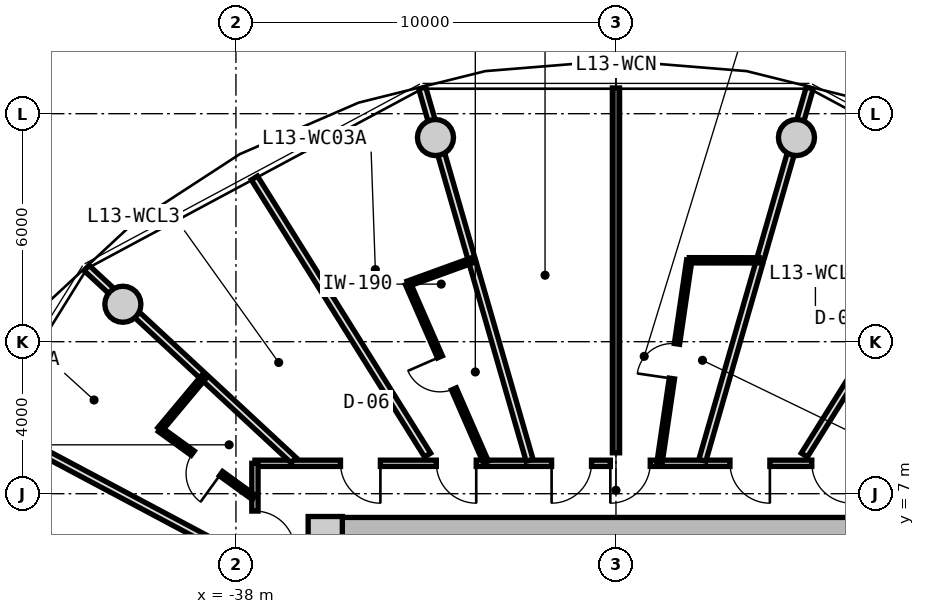
"""IFC4 building model, lengths in metres.
Left out: names, types, materials, properties, quantities, classifications, styles, units other than length and angle.
Written with IfcOpenShell. Run it as: python <this file> out.ifc"""

import sys

from ifc_helpers import new_model, si_unit, direction, frame, frame_2d, origin, origin_2d, place, context, subcontext, project, spatial, rectangle, circle, extrude, source, transform, mapped, element, fill, save


model = new_model("IFC4")
c1 = context("Model", 3, precision=1e-05, world=origin(), true_north=direction((0.0, 1.0)))
c2 = subcontext(c1, "Body", "Model", "MODEL_VIEW")
j1 = project(units=[si_unit("LENGTHUNIT", "METRE"), si_unit("PLANEANGLEUNIT", "RADIAN")], contexts=[c1])
p1 = place(None, origin())
s1 = spatial("IfcSite", under=j1, at=p1, CompositionType="ELEMENT")
p2 = place(p1, origin())
s2 = spatial("IfcBuilding", under=s1, at=p2, CompositionType="ELEMENT")
p3 = place(p2, frame((0.0, 0.0, 46.0)))
s3 = spatial("IfcBuildingStorey", under=s2, at=p3, CompositionType="ELEMENT", Elevation=46.0)
m1 = source(origin(), c2, "Body", "SweptSolid", [
    extrude(rectangle(XDim=0.9, YDim=0.9, at=origin_2d()), origin(), (0.0, 0.0, 1.0), 3.05),
])
p4 = place(p3, frame((-35.65, 5.95, 0.0), z_axis=(0.0, 0.0, 1.0), x_axis=(1.0, 0.0, 0.0)))
e1 = element("IfcColumn", 1, at=p4, inside=s3, PredefinedType="COLUMN", context=c2, shape_type="MappedRepresentation", body=[
    mapped(m1, transform((0.0, 0.0, 0.0), x_axis=(1.0, 0.0, 0.0), y_axis=(0.0, 1.0, 0.0), z_axis=(0.0, 0.0, 1.0), scale=1.0)),
])
m2 = source(origin(), c2, "Body", "SweptSolid", [
    extrude(rectangle(XDim=14.4, YDim=0.85, at=frame_2d((7.2, 0.0))), origin(), (0.0, 0.0, 1.0), 2.79),
])
p5 = place(p3, frame((-35.2, 5.95, 0.0), z_axis=(0.0, 0.0, 1.0), x_axis=(1.0, 0.0, 0.0)))
e2 = element("IfcWall", 2, at=p5, inside=s3, PredefinedType="SHEAR", context=c2, shape_type="MappedRepresentation", body=[
    mapped(m2, transform((0.0, 0.0, 0.0), x_axis=(1.0, 0.0, 0.0), y_axis=(0.0, 1.0, 0.0), z_axis=(0.0, 0.0, 1.0), scale=1.0)),
])
m3 = source(origin(), c2, "Body", "SweptSolid", [
    extrude(circle(Radius=0.475, at=origin_2d()), origin(), (0.0, 0.0, 1.0), 3.05),
])
for number, where, z_axis, x_axis in (
    (3, (-23.251, 16.373, 0.0), (0.0, 0.0, 1.0), (1.0, 0.0, 0.0)),
    (4, (-32.749, 16.373, 0.0), (0.0, 0.0, 1.0), (1.0, 0.0, 0.0)),
    (5, (-40.975, 11.985, 0.0), (0.0, 0.0, 1.0), (1.0, 0.0, 0.0)),
):
    element("IfcColumn", number, at=place(p3, frame(where, z_axis=z_axis, x_axis=x_axis)), inside=s3, PredefinedType="COLUMN", context=c2, shape_type="MappedRepresentation", body=[
        mapped(m3, transform((0.0, 0.0, 0.0), x_axis=(1.0, 0.0, 0.0), y_axis=(0.0, 1.0, 0.0), z_axis=(0.0, 0.0, 1.0), scale=1.0)),
    ])
m4 = source(origin(), c2, "Body", "SweptSolid", [
    extrude(rectangle(XDim=19.0, YDim=0.165, at=frame_2d((9.5, 0.0))), origin(), (0.0, 0.0, 1.0), 2.775),
])
p6 = place(p3, frame((-37.5, 7.8, 0.0), z_axis=(0.0, 0.0, 1.0), x_axis=(1.0, 0.0, 0.0)))
e6 = element("IfcWall", 6, at=p6, inside=s3, PredefinedType="PARTITIONING", context=c2, shape_type="MappedRepresentation", body=[
    mapped(m4, transform((0.0, 0.0, 0.0), x_axis=(1.0, 0.0, 0.0), y_axis=(0.0, 1.0, 0.0), z_axis=(0.0, 0.0, 1.0), scale=1.0)),
])
p7 = place(p6, frame((4.773, 0.0, 0.0)))
e7 = element("IfcOpeningElement", 7, at=p7, cuts=e6, PredefinedType="OPENING", context=c2, shape_type="SweptSolid", body=[
    extrude(rectangle(XDim=1.05, YDim=2.15, at=frame_2d((0.525, 1.075))), frame((0.0, 0.093, 0.0), z_axis=(0.0, -1.0, 0.0), x_axis=(1.0, 0.0, 0.0)), (0.0, 0.0, 1.0), 0.185),
])
p8 = place(p6, frame((2.251, 0.0, 0.0)))
e8 = element("IfcOpeningElement", 8, at=p8, cuts=e6, PredefinedType="OPENING", context=c2, shape_type="SweptSolid", body=[
    extrude(rectangle(XDim=1.05, YDim=2.15, at=frame_2d((0.525, 1.075))), frame((0.0, 0.093, 0.0), z_axis=(0.0, -1.0, 0.0), x_axis=(1.0, 0.0, 0.0)), (0.0, 0.0, 1.0), 0.185),
])
p9 = place(p6, frame((14.653, 0.0, 0.0)))
e9 = element("IfcOpeningElement", 9, at=p9, cuts=e6, PredefinedType="OPENING", context=c2, shape_type="SweptSolid", body=[
    extrude(rectangle(XDim=1.05, YDim=2.15, at=frame_2d((0.525, 1.075))), frame((0.0, 0.093, 0.0), z_axis=(0.0, -1.0, 0.0), x_axis=(1.0, 0.0, 0.0)), (0.0, 0.0, 1.0), 0.185),
])
p10 = place(p6, frame((12.5, 0.0, 0.0)))
e10 = element("IfcOpeningElement", 10, at=p10, cuts=e6, PredefinedType="OPENING", context=c2, shape_type="SweptSolid", body=[
    extrude(rectangle(XDim=1.05, YDim=2.15, at=frame_2d((0.525, 1.075))), frame((0.0, 0.093, 0.0), z_axis=(0.0, -1.0, 0.0), x_axis=(1.0, 0.0, 0.0)), (0.0, 0.0, 1.0), 0.185),
])
p11 = place(p6, frame((9.352, 0.0, 0.0)))
e11 = element("IfcOpeningElement", 11, at=p11, cuts=e6, PredefinedType="OPENING", context=c2, shape_type="SweptSolid", body=[
    extrude(rectangle(XDim=1.05, YDim=2.15, at=frame_2d((0.525, 1.075))), frame((0.0, 0.093, 0.0), z_axis=(0.0, -1.0, 0.0), x_axis=(1.0, 0.0, 0.0)), (0.0, 0.0, 1.0), 0.185),
])
p12 = place(p6, frame((7.806, 0.0, 0.0)))
e12 = element("IfcOpeningElement", 12, at=p12, cuts=e6, PredefinedType="OPENING", context=c2, shape_type="SweptSolid", body=[
    extrude(rectangle(XDim=1.05, YDim=2.15, at=frame_2d((0.525, 1.075))), frame((0.0, 0.093, 0.0), z_axis=(0.0, -1.0, 0.0), x_axis=(1.0, 0.0, 0.0)), (0.0, 0.0, 1.0), 0.185),
])
m5 = source(origin(), c2, "Body", "SweptSolid", [
    extrude(rectangle(XDim=15.6, YDim=0.165, at=frame_2d((7.8, 0.0))), origin(), (0.0, 0.0, 1.0), 2.775),
])
p13 = place(p3, frame((-37.5, -7.8, 0.0), z_axis=(0.0, 0.0, 1.0), x_axis=(0.0, 1.0, 0.0)))
e13 = element("IfcWall", 13, at=p13, inside=s3, PredefinedType="PARTITIONING", context=c2, shape_type="MappedRepresentation", body=[
    mapped(m5, transform((0.0, 0.0, 0.0), x_axis=(1.0, 0.0, 0.0), y_axis=(0.0, 1.0, 0.0), z_axis=(0.0, 0.0, 1.0), scale=1.0)),
])
p14 = place(p13, frame((13.293, 0.0, 0.0)))
e14 = element("IfcOpeningElement", 14, at=p14, cuts=e13, PredefinedType="OPENING", context=c2, shape_type="SweptSolid", body=[
    extrude(rectangle(XDim=1.05, YDim=2.15, at=frame_2d((0.525, 1.075))), frame((0.0, 0.093, 0.0), z_axis=(0.0, -1.0, 0.0), x_axis=(1.0, 0.0, 0.0)), (0.0, 0.0, 1.0), 0.185),
])
p15 = place(p13, frame((11.018, 0.0, 0.0)))
e15 = element("IfcOpeningElement", 15, at=p15, cuts=e13, PredefinedType="OPENING", context=c2, shape_type="SweptSolid", body=[
    extrude(rectangle(XDim=1.05, YDim=2.15, at=frame_2d((0.525, 1.075))), frame((0.0, 0.093, 0.0), z_axis=(0.0, -1.0, 0.0), x_axis=(1.0, 0.0, 0.0)), (0.0, 0.0, 1.0), 0.185),
])
p16 = place(p13, frame((7.812, 0.0, 0.0)))
e16 = element("IfcOpeningElement", 16, at=p16, cuts=e13, PredefinedType="OPENING", context=c2, shape_type="SweptSolid", body=[
    extrude(rectangle(XDim=1.05, YDim=2.15, at=frame_2d((0.525, 1.075))), frame((0.0, 0.093, 0.0), z_axis=(0.0, -1.0, 0.0), x_axis=(1.0, 0.0, 0.0)), (0.0, 0.0, 1.0), 0.185),
])
p17 = place(p13, frame((6.035, 0.0, 0.0)))
e17 = element("IfcOpeningElement", 17, at=p17, cuts=e13, PredefinedType="OPENING", context=c2, shape_type="SweptSolid", body=[
    extrude(rectangle(XDim=1.05, YDim=2.15, at=frame_2d((0.525, 1.075))), frame((0.0, 0.093, 0.0), z_axis=(0.0, -1.0, 0.0), x_axis=(1.0, 0.0, 0.0)), (0.0, 0.0, 1.0), 0.185),
])
p18 = place(p13, frame((3.489, 0.0, 0.0)))
e18 = element("IfcOpeningElement", 18, at=p18, cuts=e13, PredefinedType="OPENING", context=c2, shape_type="SweptSolid", body=[
    extrude(rectangle(XDim=1.05, YDim=2.15, at=frame_2d((0.525, 1.075))), frame((0.0, 0.093, 0.0), z_axis=(0.0, -1.0, 0.0), x_axis=(1.0, 0.0, 0.0)), (0.0, 0.0, 1.0), 0.185),
])
p19 = place(p13, frame((0.882, 0.0, 0.0)))
e19 = element("IfcOpeningElement", 19, at=p19, cuts=e13, PredefinedType="OPENING", context=c2, shape_type="SweptSolid", body=[
    extrude(rectangle(XDim=1.05, YDim=2.15, at=frame_2d((0.525, 1.075))), frame((0.0, 0.093, 0.0), z_axis=(0.0, -1.0, 0.0), x_axis=(1.0, 0.0, 0.0)), (0.0, 0.0, 1.0), 0.185),
])
m6 = source(origin(), c2, "Body", "SweptSolid", [
    extrude(rectangle(XDim=10.196, YDim=0.19, at=frame_2d((5.098, 0.0))), origin(), (0.0, 0.0, 1.0), 2.225),
])
p20 = place(p3, frame((-30.273, 7.88, 0.0), z_axis=(0.0, 0.0, 1.0), x_axis=(-0.277136420347, 0.960830580549, 0.0)))
e20 = element("IfcWall", 20, at=p20, inside=s3, PredefinedType="PARTITIONING", context=c2, shape_type="MappedRepresentation", body=[
    mapped(m6, transform((0.0, 0.0, 0.0), x_axis=(1.0, 0.0, 0.0), y_axis=(0.0, 1.0, 0.0), z_axis=(0.0, 0.0, 1.0), scale=1.0)),
])
m7 = source(origin(), c2, "Body", "SweptSolid", [
    extrude(rectangle(XDim=7.435, YDim=0.19, at=frame_2d((3.717, 0.0))), origin(), (0.0, 0.0, 1.0), 2.225),
])
p21 = place(p3, frame((-36.483, 7.88, 0.0), z_axis=(0.0, 0.0, 1.0), x_axis=(-0.732651956848, 0.680603489652, 0.0)))
e21 = element("IfcWall", 21, at=p21, inside=s3, PredefinedType="PARTITIONING", context=c2, shape_type="MappedRepresentation", body=[
    mapped(m7, transform((0.0, 0.0, 0.0), x_axis=(1.0, 0.0, 0.0), y_axis=(0.0, 1.0, 0.0), z_axis=(0.0, 0.0, 1.0), scale=1.0)),
])
m8 = source(origin(), c2, "Body", "SweptSolid", [
    extrude(rectangle(XDim=8.598, YDim=0.19, at=frame_2d((4.299, 0.0))), origin(), (0.0, 0.0, 1.0), 2.775),
])
p22 = place(p3, frame((-32.957, 8.017, 0.0), z_axis=(0.0, 0.0, 1.0), x_axis=(-0.530039776395, 0.847972779893, 0.0)))
e22 = element("IfcWall", 22, at=p22, inside=s3, PredefinedType="PARTITIONING", context=c2, shape_type="MappedRepresentation", body=[
    mapped(m8, transform((0.0, 0.0, 0.0), x_axis=(1.0, 0.0, 0.0), y_axis=(0.0, 1.0, 0.0), z_axis=(0.0, 0.0, 1.0), scale=1.0)),
])
m9 = source(origin(), c2, "Body", "SweptSolid", [
    extrude(rectangle(XDim=5.126, YDim=0.14, at=frame_2d((2.563, 0.0))), origin(), (0.0, 0.0, 1.0), 2.775),
])
p23 = place(p3, frame((-31.422, 7.83, 0.0), z_axis=(0.0, 0.0, 1.0), x_axis=(-0.400473994842, 0.916308124735, 0.0)))
e23 = element("IfcWall", 23, at=p23, inside=s3, PredefinedType="PARTITIONING", context=c2, shape_type="MappedRepresentation", body=[
    mapped(m9, transform((0.0, 0.0, 0.0), x_axis=(1.0, 0.0, 0.0), y_axis=(0.0, 1.0, 0.0), z_axis=(0.0, 0.0, 1.0), scale=1.0)),
])
p24 = place(p23, frame((2.103, 0.0, 0.0)))
e24 = element("IfcOpeningElement", 24, at=p24, cuts=e23, PredefinedType="OPENING", context=c2, shape_type="SweptSolid", body=[
    extrude(rectangle(XDim=0.92, YDim=2.1, at=frame_2d((0.46, 1.05))), frame((0.0, 0.08, 0.0), z_axis=(0.0, -1.0, 0.0), x_axis=(1.0, 0.0, 0.0)), (0.0, 0.0, 1.0), 0.16),
])
m10 = source(origin(), c2, "Body", "SweptSolid", [
    extrude(rectangle(XDim=1.811, YDim=0.14, at=frame_2d((0.906, 0.0))), origin(), (0.0, 0.0, 1.0), 2.775),
])
p25 = place(p3, frame((-33.475, 12.527, 0.0), z_axis=(0.0, 0.0, 1.0), x_axis=(0.940009682452, 0.341147764021, 0.0)))
e25 = element("IfcWall", 25, at=p25, inside=s3, PredefinedType="PARTITIONING", context=c2, shape_type="MappedRepresentation", body=[
    mapped(m10, transform((0.0, 0.0, 0.0), x_axis=(1.0, 0.0, 0.0), y_axis=(0.0, 1.0, 0.0), z_axis=(0.0, 0.0, 1.0), scale=1.0)),
])
m11 = source(origin(), c2, "Body", "SweptSolid", [
    extrude(rectangle(XDim=7.677, YDim=0.19, at=frame_2d((3.838, 0.0))), origin(), (0.0, 0.0, 1.0), 2.775),
])
p26 = place(p3, frame((-37.703, 5.231, 0.0), z_axis=(0.0, 0.0, 1.0), x_axis=(-0.882725057546, 0.469889851753, 0.0)))
e26 = element("IfcWall", 26, at=p26, inside=s3, PredefinedType="PARTITIONING", context=c2, shape_type="MappedRepresentation", body=[
    mapped(m11, transform((0.0, 0.0, 0.0), x_axis=(1.0, 0.0, 0.0), y_axis=(0.0, 1.0, 0.0), z_axis=(0.0, 0.0, 1.0), scale=1.0)),
])
m12 = source(origin(), c2, "Body", "SweptSolid", [
    extrude(rectangle(XDim=3.051, YDim=0.14, at=frame_2d((1.525, 0.0))), origin(), (0.0, 0.0, 1.0), 2.775),
])
p27 = place(p3, frame((-37.53, 6.903, 0.0), z_axis=(0.0, 0.0, 1.0), x_axis=(-0.809849031404, 0.586638343729, 0.0)))
e27 = element("IfcWall", 27, at=p27, inside=s3, PredefinedType="PARTITIONING", context=c2, shape_type="MappedRepresentation", body=[
    mapped(m12, transform((0.0, 0.0, 0.0), x_axis=(1.0, 0.0, 0.0), y_axis=(0.0, 1.0, 0.0), z_axis=(0.0, 0.0, 1.0), scale=1.0)),
])
p28 = place(p27, frame((1.065, 0.0, 0.0)))
e28 = element("IfcOpeningElement", 28, at=p28, cuts=e27, PredefinedType="OPENING", context=c2, shape_type="SweptSolid", body=[
    extrude(rectangle(XDim=0.92, YDim=2.1, at=frame_2d((0.46, 1.05))), frame((0.0, 0.08, 0.0), z_axis=(0.0, -1.0, 0.0), x_axis=(1.0, 0.0, 0.0)), (0.0, 0.0, 1.0), 0.16),
])
m13 = source(origin(), c2, "Body", "SweptSolid", [
    extrude(rectangle(XDim=1.84, YDim=0.14, at=frame_2d((0.92, 0.0))), origin(), (0.0, 0.0, 1.0), 2.415),
])
p29 = place(p3, frame((-40.0, 8.692, 0.0), z_axis=(0.0, 0.0, 1.0), x_axis=(0.641410397049, 0.767197955262, 0.0)))
e29 = element("IfcWall", 29, at=p29, inside=s3, PredefinedType="PARTITIONING", context=c2, shape_type="MappedRepresentation", body=[
    mapped(m13, transform((0.0, 0.0, 0.0), x_axis=(1.0, 0.0, 0.0), y_axis=(0.0, 1.0, 0.0), z_axis=(0.0, 0.0, 1.0), scale=1.0)),
])
p30 = place(p3, frame((-25.727, 7.88, 0.0), z_axis=(0.0, 0.0, 1.0), x_axis=(0.277136420347, 0.960830580549, 0.0)))
e30 = element("IfcWall", 30, at=p30, inside=s3, PredefinedType="PARTITIONING", context=c2, shape_type="MappedRepresentation", body=[
    mapped(m6, transform((0.0, 0.0, 0.0), x_axis=(1.0, 0.0, 0.0), y_axis=(0.0, 1.0, 0.0), z_axis=(0.0, 0.0, 1.0), scale=1.0)),
])
p31 = place(p3, frame((-23.043, 8.017, 0.0), z_axis=(0.0, 0.0, 1.0), x_axis=(0.530039776395, 0.847972779893, 0.0)))
e31 = element("IfcWall", 31, at=p31, inside=s3, PredefinedType="PARTITIONING", context=c2, shape_type="MappedRepresentation", body=[
    mapped(m8, transform((0.0, 0.0, 0.0), x_axis=(1.0, 0.0, 0.0), y_axis=(0.0, 1.0, 0.0), z_axis=(0.0, 0.0, 1.0), scale=1.0)),
])
m14 = source(origin(), c2, "Body", "SweptSolid", [
    extrude(rectangle(XDim=9.601, YDim=0.19, at=frame_2d((4.8, 0.0))), origin(), (0.0, 0.0, 1.0), 2.775),
])
p32 = place(p3, frame((-28.0, 8.076, 0.0), z_axis=(0.0, 0.0, 1.0), x_axis=(0.0, 1.0, 0.0)))
e32 = element("IfcWall", 32, at=p32, inside=s3, PredefinedType="PARTITIONING", context=c2, shape_type="MappedRepresentation", body=[
    mapped(m14, transform((0.0, 0.0, 0.0), x_axis=(1.0, 0.0, 0.0), y_axis=(0.0, 1.0, 0.0), z_axis=(0.0, 0.0, 1.0), scale=1.0)),
])
m15 = source(origin(), c2, "Body", "SweptSolid", [
    extrude(rectangle(XDim=5.37, YDim=0.14, at=frame_2d((2.685, 0.0))), origin(), (0.0, 0.0, 1.0), 2.775),
])
p33 = place(p3, frame((-26.851, 7.83, 0.0), z_axis=(0.0, 0.0, 1.0), x_axis=(0.145131397853, 0.989412389935, 0.0)))
e33 = element("IfcWall", 33, at=p33, inside=s3, PredefinedType="PARTITIONING", context=c2, shape_type="MappedRepresentation", body=[
    mapped(m15, transform((0.0, 0.0, 0.0), x_axis=(1.0, 0.0, 0.0), y_axis=(0.0, 1.0, 0.0), z_axis=(0.0, 0.0, 1.0), scale=1.0)),
])
p34 = place(p33, frame((2.225, 0.0, 0.0)))
e34 = element("IfcOpeningElement", 34, at=p34, cuts=e33, PredefinedType="OPENING", context=c2, shape_type="SweptSolid", body=[
    extrude(rectangle(XDim=0.92, YDim=2.1, at=frame_2d((0.46, 1.05))), frame((0.0, 0.08, 0.0), z_axis=(0.0, -1.0, 0.0), x_axis=(1.0, 0.0, 0.0)), (0.0, 0.0, 1.0), 0.16),
])
m16 = source(origin(), c2, "Body", "SweptSolid", [
    extrude(rectangle(XDim=1.843, YDim=0.14, at=frame_2d((0.921, 0.0))), origin(), (0.0, 0.0, 1.0), 2.775),
])
p35 = place(p3, frame((-26.072, 13.143, 0.0), z_axis=(0.0, 0.0, 1.0), x_axis=(0.999998937801, -0.001457531246, 0.0)))
e35 = element("IfcWall", 35, at=p35, inside=s3, PredefinedType="PARTITIONING", context=c2, shape_type="MappedRepresentation", body=[
    mapped(m16, transform((0.0, 0.0, 0.0), x_axis=(1.0, 0.0, 0.0), y_axis=(0.0, 1.0, 0.0), z_axis=(0.0, 0.0, 1.0), scale=1.0)),
])
m17 = source(origin(), c2, "Body", "SweptSolid", [
    extrude(rectangle(XDim=1.05, YDim=2.15, at=frame_2d((0.525, 1.075))), frame((0.0, 0.025, 0.0), z_axis=(0.0, -1.0, 0.0), x_axis=(1.0, 0.0, 0.0)), (0.0, 0.0, 1.0), 0.05),
])
p36 = place(p7, frame((1.05, 0.0, 0.0), z_axis=(0.0, 0.0, 1.0), x_axis=(-1.0, 0.0, 0.0)))
e36 = element("IfcDoor", 36, at=p36, inside=s3, OperationType="SINGLE_SWING_LEFT", PredefinedType="DOOR", context=c2, shape_type="MappedRepresentation", body=[
    mapped(m17, transform((0.0, 0.0, 0.0), x_axis=(1.0, 0.0, 0.0), y_axis=(0.0, 1.0, 0.0), z_axis=(0.0, 0.0, 1.0), scale=1.0)),
])
fill(e7, e36)
m18 = source(origin(), c2, "Body", "SweptSolid", [
    extrude(rectangle(XDim=0.92, YDim=2.1, at=frame_2d((0.46, 1.05))), frame((0.0, 0.025, 0.0), z_axis=(0.0, -1.0, 0.0), x_axis=(1.0, 0.0, 0.0)), (0.0, 0.0, 1.0), 0.05),
])
p37 = place(p24, origin())
e37 = element("IfcDoor", 37, at=p37, inside=s3, OperationType="SINGLE_SWING_RIGHT", PredefinedType="DOOR", context=c2, shape_type="MappedRepresentation", body=[
    mapped(m18, transform((0.0, 0.0, 0.0), x_axis=(1.0, 0.0, 0.0), y_axis=(0.0, 1.0, 0.0), z_axis=(0.0, 0.0, 1.0), scale=1.0)),
])
fill(e24, e37)
p38 = place(p8, frame((1.05, 0.0, 0.0), z_axis=(0.0, 0.0, 1.0), x_axis=(-1.0, 0.0, 0.0)))
e38 = element("IfcDoor", 38, at=p38, inside=s3, OperationType="SINGLE_SWING_LEFT", PredefinedType="DOOR", context=c2, shape_type="MappedRepresentation", body=[
    mapped(m17, transform((0.0, 0.0, 0.0), x_axis=(1.0, 0.0, 0.0), y_axis=(0.0, 1.0, 0.0), z_axis=(0.0, 0.0, 1.0), scale=1.0)),
])
fill(e8, e38)
p39 = place(p14, frame((1.05, 0.0, 0.0), z_axis=(0.0, 0.0, 1.0), x_axis=(-1.0, 0.0, 0.0)))
e39 = element("IfcDoor", 39, at=p39, inside=s3, OperationType="SINGLE_SWING_RIGHT", PredefinedType="DOOR", context=c2, shape_type="MappedRepresentation", body=[
    mapped(m17, transform((0.0, 0.0, 0.0), x_axis=(1.0, 0.0, 0.0), y_axis=(0.0, 1.0, 0.0), z_axis=(0.0, 0.0, 1.0), scale=1.0)),
])
fill(e14, e39)
p40 = place(p28, origin())
e40 = element("IfcDoor", 40, at=p40, inside=s3, OperationType="SINGLE_SWING_LEFT", PredefinedType="DOOR", context=c2, shape_type="MappedRepresentation", body=[
    mapped(m18, transform((0.0, 0.0, 0.0), x_axis=(1.0, 0.0, 0.0), y_axis=(0.0, 1.0, 0.0), z_axis=(0.0, 0.0, 1.0), scale=1.0)),
])
fill(e28, e40)
p41 = place(p9, frame((1.05, 0.0, 0.0), z_axis=(0.0, 0.0, 1.0), x_axis=(-1.0, 0.0, 0.0)))
e41 = element("IfcDoor", 41, at=p41, inside=s3, OperationType="SINGLE_SWING_LEFT", PredefinedType="DOOR", context=c2, shape_type="MappedRepresentation", body=[
    mapped(m17, transform((0.0, 0.0, 0.0), x_axis=(1.0, 0.0, 0.0), y_axis=(0.0, 1.0, 0.0), z_axis=(0.0, 0.0, 1.0), scale=1.0)),
])
fill(e9, e41)
p42 = place(p10, frame((1.05, 0.0, 0.0), z_axis=(0.0, 0.0, 1.0), x_axis=(-1.0, 0.0, 0.0)))
e42 = element("IfcDoor", 42, at=p42, inside=s3, OperationType="SINGLE_SWING_LEFT", PredefinedType="DOOR", context=c2, shape_type="MappedRepresentation", body=[
    mapped(m17, transform((0.0, 0.0, 0.0), x_axis=(1.0, 0.0, 0.0), y_axis=(0.0, 1.0, 0.0), z_axis=(0.0, 0.0, 1.0), scale=1.0)),
])
fill(e10, e42)
p43 = place(p11, frame((1.05, 0.0, 0.0), z_axis=(0.0, 0.0, 1.0), x_axis=(-1.0, 0.0, 0.0)))
e43 = element("IfcDoor", 43, at=p43, inside=s3, OperationType="SINGLE_SWING_RIGHT", PredefinedType="DOOR", context=c2, shape_type="MappedRepresentation", body=[
    mapped(m17, transform((0.0, 0.0, 0.0), x_axis=(1.0, 0.0, 0.0), y_axis=(0.0, 1.0, 0.0), z_axis=(0.0, 0.0, 1.0), scale=1.0)),
])
fill(e11, e43)
p44 = place(p34, origin())
e44 = element("IfcDoor", 44, at=p44, inside=s3, OperationType="SINGLE_SWING_LEFT", PredefinedType="DOOR", context=c2, shape_type="MappedRepresentation", body=[
    mapped(m18, transform((0.0, 0.0, 0.0), x_axis=(1.0, 0.0, 0.0), y_axis=(0.0, 1.0, 0.0), z_axis=(0.0, 0.0, 1.0), scale=1.0)),
])
fill(e34, e44)
p45 = place(p12, frame((1.05, 0.0, 0.0), z_axis=(0.0, 0.0, 1.0), x_axis=(-1.0, 0.0, 0.0)))
e45 = element("IfcDoor", 45, at=p45, inside=s3, OperationType="SINGLE_SWING_RIGHT", PredefinedType="DOOR", context=c2, shape_type="MappedRepresentation", body=[
    mapped(m17, transform((0.0, 0.0, 0.0), x_axis=(1.0, 0.0, 0.0), y_axis=(0.0, 1.0, 0.0), z_axis=(0.0, 0.0, 1.0), scale=1.0)),
])
fill(e12, e45)
save(model, sys.argv[1])
